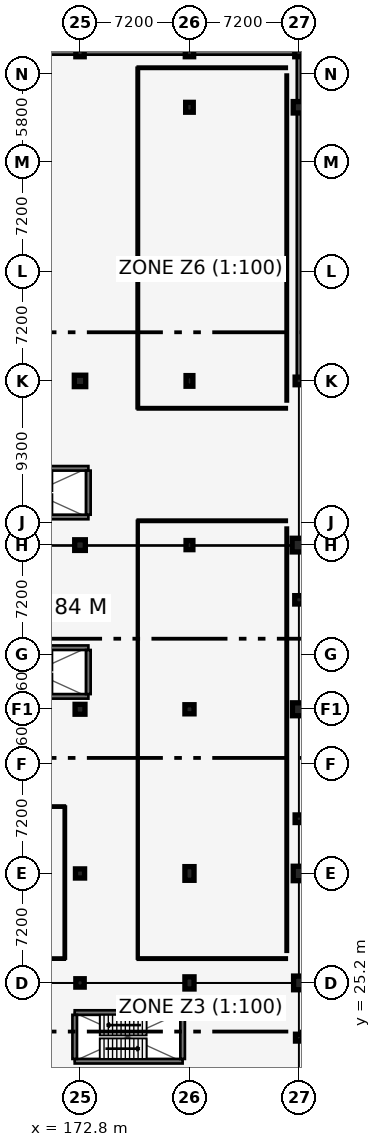
"""IFC4 building model, lengths in metres.
Left out: names, types, materials, properties, quantities, classifications, styles, units other than length and angle.
Written with IfcOpenShell. Run it as: python <this file> out.ifc"""

import sys

from ifc_helpers import new_model, si_unit, direction, frame, frame_2d, origin, origin_2d, place, context, subcontext, project, spatial, rectangle, circle, extrude, element, fill, save


model = new_model("IFC4")
c1 = context("Model", 3, precision=1e-05, world=origin(), true_north=direction((0.0, 1.0)))
c2 = subcontext(c1, "Body", "Model", "MODEL_VIEW")
j1 = project(units=[si_unit("LENGTHUNIT", "METRE"), si_unit("PLANEANGLEUNIT", "RADIAN")], contexts=[c1])
p1 = place(None, origin())
s1 = spatial("IfcSite", under=j1, at=p1, CompositionType="ELEMENT")
p2 = place(p1, origin())
s2 = spatial("IfcBuilding", under=s1, at=p2, CompositionType="ELEMENT")
p3 = place(p2, frame((0.0, 0.0, 4.8)))
s3 = spatial("IfcBuildingStorey", under=s2, at=p3, CompositionType="ELEMENT", Elevation=4.8)
p4 = place(p3, frame((172.8, 25.2, 0.0), z_axis=(0.0, 0.0, 1.0), x_axis=(1.0, 0.0, 0.0)))
e1 = element("IfcColumn", 1, at=p4, inside=s3, PredefinedType="COLUMN", context=c2, shape_type="SweptSolid", body=[
    extrude(rectangle(XDim=0.55, YDim=0.55, at=origin_2d()), origin(), (0.0, 0.0, 1.0), 4.2),
])
p5 = place(p3, frame((172.8, 32.4, 0.0), z_axis=(0.0, 0.0, 1.0), x_axis=(1.0, 0.0, 0.0)))
e2 = element("IfcColumn", 2, at=p5, inside=s3, PredefinedType="COLUMN", context=c2, shape_type="SweptSolid", body=[
    extrude(rectangle(XDim=0.6, YDim=0.6, at=origin_2d()), origin(), (0.0, 0.0, 1.0), 4.2),
])
p6 = place(p3, frame((172.8, 43.2, 0.0), z_axis=(0.0, 0.0, 1.0), x_axis=(1.0, 0.0, 0.0)))
e3 = element("IfcColumn", 3, at=p6, inside=s3, PredefinedType="COLUMN", context=c2, shape_type="SweptSolid", body=[
    extrude(rectangle(XDim=0.65, YDim=0.65, at=origin_2d()), origin(), (0.0, 0.0, 1.0), 4.2),
])
p7 = place(p3, frame((172.8, 54.0, 0.0), z_axis=(0.0, 0.0, 1.0), x_axis=(1.0, 0.0, 0.0)))
e4 = element("IfcColumn", 4, at=p7, inside=s3, PredefinedType="COLUMN", context=c2, shape_type="SweptSolid", body=[
    extrude(rectangle(XDim=0.7, YDim=0.7, at=origin_2d()), origin(), (0.0, 0.0, 1.0), 4.2),
])
p8 = place(p3, frame((172.8, 64.8, 0.0), z_axis=(0.0, 0.0, 1.0), x_axis=(1.0, 0.0, 0.0)))
e5 = element("IfcColumn", 5, at=p8, inside=s3, PredefinedType="COLUMN", context=c2, shape_type="SweptSolid", body=[
    extrude(rectangle(XDim=0.75, YDim=0.75, at=origin_2d()), origin(), (0.0, 0.0, 1.0), 4.2),
])
p9 = place(p3, frame((172.8, 86.4, 0.0), z_axis=(0.0, 0.0, 1.0), x_axis=(1.0, 0.0, 0.0)))
e6 = element("IfcColumn", 6, at=p9, inside=s3, PredefinedType="COLUMN", context=c2, shape_type="SweptSolid", body=[
    extrude(rectangle(XDim=0.55, YDim=0.55, at=origin_2d()), origin(), (0.0, 0.0, 1.0), 4.2),
])
p10 = place(p3, frame((180.0, 25.2, 0.0), z_axis=(0.0, 0.0, 1.0), x_axis=(1.0, 0.0, 0.0)))
e7 = element("IfcColumn", 7, at=p10, inside=s3, PredefinedType="COLUMN", context=c2, shape_type="SweptSolid", body=[
    extrude(rectangle(XDim=0.6, YDim=0.8, at=origin_2d()), origin(), (0.0, 0.0, 1.0), 4.2),
])
p11 = place(p3, frame((180.0, 32.4, 0.0), z_axis=(0.0, 0.0, 1.0), x_axis=(1.0, 0.0, 0.0)))
e8 = element("IfcColumn", 8, at=p11, inside=s3, PredefinedType="COLUMN", context=c2, shape_type="SweptSolid", body=[
    extrude(rectangle(XDim=0.6, YDim=0.9, at=origin_2d()), origin(), (0.0, 0.0, 1.0), 4.2),
])
p12 = place(p3, frame((180.0, 43.2, 0.0), z_axis=(0.0, 0.0, 1.0), x_axis=(1.0, 0.0, 0.0)))
e9 = element("IfcColumn", 9, at=p12, inside=s3, PredefinedType="COLUMN", context=c2, shape_type="SweptSolid", body=[
    extrude(circle(Radius=0.3, at=origin_2d()), origin(), (0.0, 0.0, 1.0), 4.2),
])
p13 = place(p3, frame((180.0, 54.0, 0.0), z_axis=(0.0, 0.0, 1.0), x_axis=(1.0, 0.0, 0.0)))
e10 = element("IfcColumn", 10, at=p13, inside=s3, PredefinedType="COLUMN", context=c2, shape_type="SweptSolid", body=[
    extrude(rectangle(XDim=0.45, YDim=0.6, at=origin_2d()), origin(), (0.0, 0.0, 1.0), 4.2),
])
p14 = place(p3, frame((180.0, 64.8, 0.0), z_axis=(0.0, 0.0, 1.0), x_axis=(1.0, 0.0, 0.0)))
e11 = element("IfcColumn", 11, at=p14, inside=s3, PredefinedType="COLUMN", context=c2, shape_type="SweptSolid", body=[
    extrude(rectangle(XDim=0.45, YDim=0.7, at=origin_2d()), origin(), (0.0, 0.0, 1.0), 4.2),
])
p15 = place(p3, frame((180.0, 82.8, 0.0), z_axis=(0.0, 0.0, 1.0), x_axis=(1.0, 0.0, 0.0)))
e12 = element("IfcColumn", 12, at=p15, inside=s3, PredefinedType="COLUMN", context=c2, shape_type="SweptSolid", body=[
    extrude(rectangle(XDim=0.5, YDim=0.65, at=origin_2d()), origin(), (0.0, 0.0, 1.0), 4.2),
])
p16 = place(p3, frame((180.0, 86.4, 0.0), z_axis=(0.0, 0.0, 1.0), x_axis=(1.0, 0.0, 0.0)))
e13 = element("IfcColumn", 13, at=p16, inside=s3, PredefinedType="COLUMN", context=c2, shape_type="SweptSolid", body=[
    extrude(rectangle(XDim=0.55, YDim=0.55, at=origin_2d()), origin(), (0.0, 0.0, 1.0), 4.2),
])
p17 = place(p3, frame((187.2, 21.6, 0.0), z_axis=(0.0, 0.0, 1.0), x_axis=(1.0, 0.0, 0.0)))
e14 = element("IfcColumn", 14, at=p17, inside=s3, PredefinedType="COLUMN", context=c2, shape_type="SweptSolid", body=[
    extrude(rectangle(XDim=0.45, YDim=0.45, at=origin_2d()), origin(), (0.0, 0.0, 1.0), 4.2),
])
p18 = place(p3, frame((187.2, 25.2, 0.0), z_axis=(0.0, 0.0, 1.0), x_axis=(1.0, 0.0, 0.0)))
e15 = element("IfcColumn", 15, at=p18, inside=s3, PredefinedType="COLUMN", context=c2, shape_type="SweptSolid", body=[
    extrude(rectangle(XDim=0.7, YDim=0.9, at=origin_2d()), origin(), (0.0, 0.0, 1.0), 4.2),
])
p19 = place(p3, frame((187.2, 32.4, 0.0), z_axis=(0.0, 0.0, 1.0), x_axis=(1.0, 0.0, 0.0)))
e16 = element("IfcColumn", 16, at=p19, inside=s3, PredefinedType="COLUMN", context=c2, shape_type="SweptSolid", body=[
    extrude(rectangle(XDim=0.75, YDim=0.95, at=origin_2d()), origin(), (0.0, 0.0, 1.0), 4.2),
])
p20 = place(p3, frame((187.2, 36.0, 0.0), z_axis=(0.0, 0.0, 1.0), x_axis=(1.0, 0.0, 0.0)))
e17 = element("IfcColumn", 17, at=p20, inside=s3, PredefinedType="COLUMN", context=c2, shape_type="SweptSolid", body=[
    extrude(rectangle(XDim=0.5, YDim=0.5, at=origin_2d()), origin(), (0.0, 0.0, 1.0), 4.2),
])
p21 = place(p3, frame((187.2, 43.2, 0.0), z_axis=(0.0, 0.0, 1.0), x_axis=(1.0, 0.0, 0.0)))
e18 = element("IfcColumn", 18, at=p21, inside=s3, PredefinedType="COLUMN", context=c2, shape_type="SweptSolid", body=[
    extrude(rectangle(XDim=0.85, YDim=0.85, at=origin_2d()), origin(), (0.0, 0.0, 1.0), 4.2),
])
p22 = place(p3, frame((187.2, 50.4, 0.0), z_axis=(0.0, 0.0, 1.0), x_axis=(1.0, 0.0, 0.0)))
e19 = element("IfcColumn", 19, at=p22, inside=s3, PredefinedType="COLUMN", context=c2, shape_type="SweptSolid", body=[
    extrude(rectangle(XDim=0.55, YDim=0.55, at=origin_2d()), origin(), (0.0, 0.0, 1.0), 4.2),
])
p23 = place(p3, frame((187.2, 54.0, 0.0), z_axis=(0.0, 0.0, 1.0), x_axis=(1.0, 0.0, 0.0)))
e20 = element("IfcColumn", 20, at=p23, inside=s3, PredefinedType="COLUMN", context=c2, shape_type="SweptSolid", body=[
    extrude(rectangle(XDim=0.9, YDim=0.9, at=origin_2d()), origin(), (0.0, 0.0, 1.0), 4.2),
])
p24 = place(p3, frame((187.2, 64.8, 0.0), z_axis=(0.0, 0.0, 1.0), x_axis=(1.0, 0.0, 0.0)))
e21 = element("IfcColumn", 21, at=p24, inside=s3, PredefinedType="COLUMN", context=c2, shape_type="SweptSolid", body=[
    extrude(circle(Radius=0.25, at=origin_2d()), origin(), (0.0, 0.0, 1.0), 4.2),
])
p25 = place(p3, frame((187.2, 82.8, 0.0), z_axis=(0.0, 0.0, 1.0), x_axis=(1.0, 0.0, 0.0)))
e22 = element("IfcColumn", 22, at=p25, inside=s3, PredefinedType="COLUMN", context=c2, shape_type="SweptSolid", body=[
    extrude(circle(Radius=0.375, at=origin_2d()), origin(), (0.0, 0.0, 1.0), 4.2),
])
p26 = place(p3, frame((187.2, 86.4, 0.0), z_axis=(0.0, 0.0, 1.0), x_axis=(1.0, 0.0, 0.0)))
e23 = element("IfcColumn", 23, at=p26, inside=s3, PredefinedType="COLUMN", context=c2, shape_type="SweptSolid", body=[
    extrude(rectangle(XDim=0.55, YDim=0.55, at=origin_2d()), origin(), (0.0, 0.0, 1.0), 4.2),
])
p27 = place(p3, frame((187.2, 64.8, 0.0), z_axis=(0.0, 0.0, 1.0), x_axis=(0.0, 1.0, 0.0)))
e24 = element("IfcWall", 24, at=p27, inside=s3, PredefinedType="SOLIDWALL", context=c2, shape_type="SweptSolid", body=[
    extrude(rectangle(XDim=21.6, YDim=0.28, at=frame_2d((10.8, 0.0))), origin(), (0.0, 0.0, 1.0), 3.5),
])
p28 = place(p27, frame((2.2, 0.0, 0.78)))
e25 = element("IfcOpeningElement", 25, at=p28, cuts=e24, PredefinedType="OPENING", context=c2, shape_type="SweptSolid", body=[
    extrude(rectangle(XDim=1.95, YDim=1.8, at=frame_2d((0.975, 0.9))), frame((0.0, 0.15, 0.0), z_axis=(0.0, -1.0, 0.0), x_axis=(1.0, 0.0, 0.0)), (0.0, 0.0, 1.0), 0.3),
])
p29 = place(p27, frame((9.4, 0.0, 0.78)))
e26 = element("IfcOpeningElement", 26, at=p29, cuts=e24, PredefinedType="OPENING", context=c2, shape_type="SweptSolid", body=[
    extrude(rectangle(XDim=2.1, YDim=1.8, at=frame_2d((1.05, 0.9))), frame((0.0, 0.15, 0.0), z_axis=(0.0, -1.0, 0.0), x_axis=(1.0, 0.0, 0.0)), (0.0, 0.0, 1.0), 0.3),
])
p30 = place(p3, frame((187.2, 86.4, 0.0), z_axis=(0.0, 0.0, 1.0), x_axis=(-1.0, 0.0, 0.0)))
e27 = element("IfcWall", 27, at=p30, inside=s3, PredefinedType="SOLIDWALL", context=c2, shape_type="SweptSolid", body=[
    extrude(rectangle(XDim=21.6, YDim=0.28, at=frame_2d((10.8, 0.0))), origin(), (0.0, 0.0, 1.0), 3.5),
])
p31 = place(p30, frame((2.2, 0.0, 0.78)))
e28 = element("IfcOpeningElement", 28, at=p31, cuts=e27, PredefinedType="OPENING", context=c2, shape_type="SweptSolid", body=[
    extrude(rectangle(XDim=2.1, YDim=1.8, at=frame_2d((1.05, 0.9))), frame((0.0, 0.15, 0.0), z_axis=(0.0, -1.0, 0.0), x_axis=(1.0, 0.0, 0.0)), (0.0, 0.0, 1.0), 0.3),
])
p32 = place(p30, frame((9.4, 0.0, 0.78)))
e29 = element("IfcOpeningElement", 29, at=p32, cuts=e27, PredefinedType="OPENING", context=c2, shape_type="SweptSolid", body=[
    extrude(rectangle(XDim=1.1, YDim=1.65, at=frame_2d((0.55, 0.825))), frame((0.0, 0.15, 0.0), z_axis=(0.0, -1.0, 0.0), x_axis=(1.0, 0.0, 0.0)), (0.0, 0.0, 1.0), 0.3),
])
p33 = place(p3, frame((216.0, 64.8, 0.0), z_axis=(0.0, 0.0, 1.0), x_axis=(-1.0, 0.0, 0.0)))
e30 = element("IfcWall", 30, at=p33, inside=s3, PredefinedType="SOLIDWALL", context=c2, shape_type="SweptSolid", body=[
    extrude(rectangle(XDim=28.8, YDim=0.28, at=frame_2d((14.4, 0.0))), origin(), (0.0, 0.0, 1.0), 3.235),
])
p34 = place(p33, frame((2.2, 0.0, 0.72)))
e31 = element("IfcOpeningElement", 31, at=p34, cuts=e30, PredefinedType="OPENING", context=c2, shape_type="SweptSolid", body=[
    extrude(rectangle(XDim=1.8, YDim=2.15, at=frame_2d((0.9, 1.075))), frame((0.0, 0.15, 0.0), z_axis=(0.0, -1.0, 0.0), x_axis=(1.0, 0.0, 0.0)), (0.0, 0.0, 1.0), 0.3),
])
p35 = place(p33, frame((9.4, 0.0, 0.72)))
e32 = element("IfcOpeningElement", 32, at=p35, cuts=e30, PredefinedType="OPENING", context=c2, shape_type="SweptSolid", body=[
    extrude(rectangle(XDim=1.2, YDim=2.0, at=frame_2d((0.6, 1.0))), frame((0.0, 0.15, 0.0), z_axis=(0.0, -1.0, 0.0), x_axis=(1.0, 0.0, 0.0)), (0.0, 0.0, 1.0), 0.3),
])
p36 = place(p33, frame((16.6, 0.0, 0.72)))
e33 = element("IfcOpeningElement", 33, at=p36, cuts=e30, PredefinedType="OPENING", context=c2, shape_type="SweptSolid", body=[
    extrude(rectangle(XDim=1.35, YDim=2.05, at=frame_2d((0.675, 1.025))), frame((0.0, 0.15, 0.0), z_axis=(0.0, -1.0, 0.0), x_axis=(1.0, 0.0, 0.0)), (0.0, 0.0, 1.0), 0.3),
])
p37 = place(p3, frame((172.45, 20.05, 0.0), z_axis=(0.0, 0.0, 1.0), x_axis=(1.0, 0.0, 0.0)))
e34 = element("IfcWall", 34, at=p37, inside=s3, PredefinedType="SHEAR", context=c2, shape_type="SweptSolid", body=[
    extrude(rectangle(XDim=7.1, YDim=0.3, at=frame_2d((3.55, 0.0))), origin(), (0.0, 0.0, 1.0), 3.84),
])
p38 = place(p37, frame((0.35, 0.0, 0.0)))
e35 = element("IfcOpeningElement", 35, at=p38, cuts=e34, PredefinedType="OPENING", context=c2, shape_type="SweptSolid", body=[
    extrude(rectangle(XDim=1.07, YDim=2.15, at=frame_2d((0.535, 1.075))), frame((0.0, 0.16, 0.0), z_axis=(0.0, -1.0, 0.0), x_axis=(1.0, 0.0, 0.0)), (0.0, 0.0, 1.0), 0.32),
])
p39 = place(p3, frame((179.55, 23.25, 0.0), z_axis=(0.0, 0.0, 1.0), x_axis=(-1.0, 0.0, 0.0)))
e36 = element("IfcWall", 36, at=p39, inside=s3, PredefinedType="SHEAR", context=c2, shape_type="SweptSolid", body=[
    extrude(rectangle(XDim=7.1, YDim=0.3, at=frame_2d((3.55, 0.0))), origin(), (0.0, 0.0, 1.0), 3.84),
])
for number, where, z_axis, x_axis in (
    (37, (179.55, 20.2, 0.0), (0.0, 0.0, 1.0), (0.0, 1.0, 0.0)),
    (38, (172.45, 23.1, 0.0), (0.0, 0.0, 1.0), (0.0, -1.0, 0.0)),
):
    element("IfcWall", number, at=place(p3, frame(where, z_axis=z_axis, x_axis=x_axis)), inside=s3, PredefinedType="SHEAR", context=c2, shape_type="SweptSolid", body=[
        extrude(rectangle(XDim=2.9, YDim=0.3, at=frame_2d((1.45, 0.0))), origin(), (0.0, 0.0, 1.0), 3.84),
    ])
for number, where, z_axis, x_axis in (
    (39, (166.25, 44.05, 0.0), (0.0, 0.0, 1.0), (1.0, 0.0, 0.0)),
    (40, (173.35, 47.25, 0.0), (0.0, 0.0, 1.0), (-1.0, 0.0, 0.0)),
):
    element("IfcWall", number, at=place(p3, frame(where, z_axis=z_axis, x_axis=x_axis)), inside=s3, PredefinedType="SHEAR", context=c2, shape_type="SweptSolid", body=[
        extrude(rectangle(XDim=7.1, YDim=0.3, at=frame_2d((3.55, 0.0))), origin(), (0.0, 0.0, 1.0), 3.925),
    ])
p40 = place(p3, frame((173.35, 44.2, 0.0), z_axis=(0.0, 0.0, 1.0), x_axis=(0.0, 1.0, 0.0)))
e41 = element("IfcWall", 41, at=p40, inside=s3, PredefinedType="SHEAR", context=c2, shape_type="SweptSolid", body=[
    extrude(rectangle(XDim=2.9, YDim=0.3, at=frame_2d((1.45, 0.0))), origin(), (0.0, 0.0, 1.0), 3.925),
])
for number, where, z_axis, x_axis in (
    (42, (166.25, 55.85, 0.0), (0.0, 0.0, 1.0), (1.0, 0.0, 0.0)),
    (43, (173.35, 59.05, 0.0), (0.0, 0.0, 1.0), (-1.0, 0.0, 0.0)),
):
    element("IfcWall", number, at=place(p3, frame(where, z_axis=z_axis, x_axis=x_axis)), inside=s3, PredefinedType="SHEAR", context=c2, shape_type="SweptSolid", body=[
        extrude(rectangle(XDim=7.1, YDim=0.3, at=frame_2d((3.55, 0.0))), origin(), (0.0, 0.0, 1.0), 3.925),
    ])
p41 = place(p3, frame((173.35, 56.0, 0.0), z_axis=(0.0, 0.0, 1.0), x_axis=(0.0, 1.0, 0.0)))
e44 = element("IfcWall", 44, at=p41, inside=s3, PredefinedType="SHEAR", context=c2, shape_type="SweptSolid", body=[
    extrude(rectangle(XDim=2.9, YDim=0.3, at=frame_2d((1.45, 0.0))), origin(), (0.0, 0.0, 1.0), 3.925),
])
p42 = place(p3, frame((176.6, 55.6, 0.0), z_axis=(0.0, 0.0, 1.0), x_axis=(1.0, 0.0, 0.0)))
e45 = element("IfcWall", 45, at=p42, inside=s3, PredefinedType="PARTITIONING", context=c2, shape_type="SweptSolid", body=[
    extrude(rectangle(XDim=9.8, YDim=0.15, at=frame_2d((4.9, 0.0))), origin(), (0.0, 0.0, 1.0), 3.057),
])
p43 = place(p3, frame((186.4, 26.8, 0.0), z_axis=(0.0, 0.0, 1.0), x_axis=(-1.0, 0.0, 0.0)))
e46 = element("IfcWall", 46, at=p43, inside=s3, PredefinedType="PARTITIONING", context=c2, shape_type="SweptSolid", body=[
    extrude(rectangle(XDim=9.8, YDim=0.15, at=frame_2d((4.9, 0.0))), origin(), (0.0, 0.0, 1.0), 3.472),
])
p44 = place(p3, frame((186.4, 27.25, 0.0), z_axis=(0.0, 0.0, 1.0), x_axis=(0.0, 1.0, 0.0)))
e47 = element("IfcWall", 47, at=p44, inside=s3, PredefinedType="PARTITIONING", context=c2, shape_type="SweptSolid", body=[
    extrude(rectangle(XDim=27.9, YDim=0.15, at=frame_2d((13.95, 0.0))), origin(), (0.0, 0.0, 1.0), 3.007),
])
p45 = place(p3, frame((176.6, 55.6, 0.0), z_axis=(0.0, 0.0, 1.0), x_axis=(0.0, -1.0, 0.0)))
e48 = element("IfcWall", 48, at=p45, inside=s3, PredefinedType="PARTITIONING", context=c2, shape_type="SweptSolid", body=[
    extrude(rectangle(XDim=28.8, YDim=0.11, at=frame_2d((14.4, 0.0))), origin(), (0.0, 0.0, 1.0), 3.057),
])
p46 = place(p45, frame((13.915, 0.0, 0.0)))
e49 = element("IfcOpeningElement", 49, at=p46, cuts=e48, PredefinedType="OPENING", context=c2, shape_type="SweptSolid", body=[
    extrude(rectangle(XDim=0.97, YDim=2.15, at=frame_2d((0.485, 1.075))), frame((0.0, 0.065, 0.0), z_axis=(0.0, -1.0, 0.0), x_axis=(1.0, 0.0, 0.0)), (0.0, 0.0, 1.0), 0.13),
])
p47 = place(p3, frame((176.6, 85.4, 0.0), z_axis=(0.0, 0.0, 1.0), x_axis=(1.0, 0.0, 0.0)))
e50 = element("IfcWall", 50, at=p47, inside=s3, PredefinedType="PARTITIONING", context=c2, shape_type="SweptSolid", body=[
    extrude(rectangle(XDim=9.8, YDim=0.15, at=frame_2d((4.9, 0.0))), origin(), (0.0, 0.0, 1.0), 3.007),
])
p48 = place(p3, frame((186.4, 63.0, 0.0), z_axis=(0.0, 0.0, 1.0), x_axis=(-1.0, 0.0, 0.0)))
e51 = element("IfcWall", 51, at=p48, inside=s3, PredefinedType="PARTITIONING", context=c2, shape_type="SweptSolid", body=[
    extrude(rectangle(XDim=9.8, YDim=0.15, at=frame_2d((4.9, 0.0))), origin(), (0.0, 0.0, 1.0), 3.057),
])
p49 = place(p3, frame((186.4, 63.45, 0.0), z_axis=(0.0, 0.0, 1.0), x_axis=(0.0, 1.0, 0.0)))
e52 = element("IfcWall", 52, at=p49, inside=s3, PredefinedType="PARTITIONING", context=c2, shape_type="SweptSolid", body=[
    extrude(rectangle(XDim=21.5, YDim=0.15, at=frame_2d((10.75, 0.0))), origin(), (0.0, 0.0, 1.0), 3.407),
])
p50 = place(p3, frame((176.6, 85.4, 0.0), z_axis=(0.0, 0.0, 1.0), x_axis=(0.0, -1.0, 0.0)))
e53 = element("IfcWall", 53, at=p50, inside=s3, PredefinedType="PARTITIONING", context=c2, shape_type="SweptSolid", body=[
    extrude(rectangle(XDim=22.4, YDim=0.15, at=frame_2d((11.2, 0.0))), origin(), (0.0, 0.0, 1.0), 2.907),
])
p51 = place(p50, frame((10.72, 0.0, 0.0)))
e54 = element("IfcOpeningElement", 54, at=p51, cuts=e53, PredefinedType="OPENING", context=c2, shape_type="SweptSolid", body=[
    extrude(rectangle(XDim=0.96, YDim=2.15, at=frame_2d((0.48, 1.075))), frame((0.0, 0.085, 0.0), z_axis=(0.0, -1.0, 0.0), x_axis=(1.0, 0.0, 0.0)), (0.0, 0.0, 1.0), 0.17),
])
for number, where, z_axis, x_axis in (
    (55, (166.2, 36.8, 0.0), (0.0, 0.0, 1.0), (1.0, 0.0, 0.0)),
    (56, (171.8, 26.8, 0.0), (0.0, 0.0, 1.0), (-1.0, 0.0, 0.0)),
):
    element("IfcWall", number, at=place(p3, frame(where, z_axis=z_axis, x_axis=x_axis)), inside=s3, PredefinedType="PARTITIONING", context=c2, shape_type="SweptSolid", body=[
        extrude(rectangle(XDim=5.6, YDim=0.14, at=frame_2d((2.8, 0.0))), origin(), (0.0, 0.0, 1.0), 3.5),
    ])
p52 = place(p3, frame((171.8, 26.8, 0.0), z_axis=(0.0, 0.0, 1.0), x_axis=(0.0, 1.0, 0.0)))
e57 = element("IfcWall", 57, at=p52, inside=s3, PredefinedType="PARTITIONING", context=c2, shape_type="SweptSolid", body=[
    extrude(rectangle(XDim=10.0, YDim=0.14, at=frame_2d((5.0, 0.0))), origin(), (0.0, 0.0, 1.0), 3.5),
])
p53 = place(p52, frame((2.703, 0.0, 0.0)))
e58 = element("IfcOpeningElement", 58, at=p53, cuts=e57, PredefinedType="OPENING", context=c2, shape_type="SweptSolid", body=[
    extrude(rectangle(XDim=0.99, YDim=2.15, at=frame_2d((0.495, 1.075))), frame((0.0, 0.08, 0.0), z_axis=(0.0, -1.0, 0.0), x_axis=(1.0, 0.0, 0.0)), (0.0, 0.0, 1.0), 0.16),
])
p54 = place(p28, origin())
e59 = element("IfcWindow", 59, at=p54, inside=s3, PartitioningType="SINGLE_PANEL", PredefinedType="WINDOW", context=c2, shape_type="SweptSolid", body=[
    extrude(rectangle(XDim=1.95, YDim=1.8, at=frame_2d((0.975, 0.9))), frame((0.0, 0.03, 0.0), z_axis=(0.0, -1.0, 0.0), x_axis=(1.0, 0.0, 0.0)), (0.0, 0.0, 1.0), 0.06),
])
fill(e25, e59)
p55 = place(p29, origin())
e60 = element("IfcWindow", 60, at=p55, inside=s3, PartitioningType="SINGLE_PANEL", PredefinedType="WINDOW", context=c2, shape_type="SweptSolid", body=[
    extrude(rectangle(XDim=2.1, YDim=1.8, at=frame_2d((1.05, 0.9))), frame((0.0, 0.03, 0.0), z_axis=(0.0, -1.0, 0.0), x_axis=(1.0, 0.0, 0.0)), (0.0, 0.0, 1.0), 0.06),
])
fill(e26, e60)
p56 = place(p31, origin())
e61 = element("IfcWindow", 61, at=p56, inside=s3, PartitioningType="SINGLE_PANEL", PredefinedType="WINDOW", context=c2, shape_type="SweptSolid", body=[
    extrude(rectangle(XDim=2.1, YDim=1.8, at=frame_2d((1.05, 0.9))), frame((0.0, 0.03, 0.0), z_axis=(0.0, -1.0, 0.0), x_axis=(1.0, 0.0, 0.0)), (0.0, 0.0, 1.0), 0.06),
])
fill(e28, e61)
p57 = place(p32, origin())
e62 = element("IfcWindow", 62, at=p57, inside=s3, PartitioningType="SINGLE_PANEL", PredefinedType="WINDOW", context=c2, shape_type="SweptSolid", body=[
    extrude(rectangle(XDim=1.1, YDim=1.65, at=frame_2d((0.55, 0.825))), frame((0.0, 0.03, 0.0), z_axis=(0.0, -1.0, 0.0), x_axis=(1.0, 0.0, 0.0)), (0.0, 0.0, 1.0), 0.06),
])
fill(e29, e62)
p58 = place(p38, origin())
e63 = element("IfcDoor", 63, at=p58, inside=s3, OperationType="SINGLE_SWING_RIGHT", PredefinedType="DOOR", context=c2, shape_type="SweptSolid", body=[
    extrude(rectangle(XDim=1.07, YDim=2.15, at=frame_2d((0.535, 1.075))), frame((0.0, 0.025, 0.0), z_axis=(0.0, -1.0, 0.0), x_axis=(1.0, 0.0, 0.0)), (0.0, 0.0, 1.0), 0.05),
])
fill(e35, e63)
p59 = place(p46, origin())
e64 = element("IfcDoor", 64, at=p59, inside=s3, OperationType="SINGLE_SWING_RIGHT", PredefinedType="DOOR", context=c2, shape_type="SweptSolid", body=[
    extrude(rectangle(XDim=0.97, YDim=2.15, at=frame_2d((0.485, 1.075))), frame((0.0, 0.025, 0.0), z_axis=(0.0, -1.0, 0.0), x_axis=(1.0, 0.0, 0.0)), (0.0, 0.0, 1.0), 0.05),
])
fill(e49, e64)
p60 = place(p51, origin())
e65 = element("IfcDoor", 65, at=p60, inside=s3, OperationType="SINGLE_SWING_LEFT", PredefinedType="DOOR", context=c2, shape_type="SweptSolid", body=[
    extrude(rectangle(XDim=0.96, YDim=2.15, at=frame_2d((0.48, 1.075))), frame((0.0, 0.025, 0.0), z_axis=(0.0, -1.0, 0.0), x_axis=(1.0, 0.0, 0.0)), (0.0, 0.0, 1.0), 0.05),
])
fill(e54, e65)
p61 = place(p53, origin())
e66 = element("IfcDoor", 66, at=p61, inside=s3, OperationType="SINGLE_SWING_RIGHT", PredefinedType="DOOR", context=c2, shape_type="SweptSolid", body=[
    extrude(rectangle(XDim=0.99, YDim=2.15, at=frame_2d((0.495, 1.075))), frame((0.0, 0.025, 0.0), z_axis=(0.0, -1.0, 0.0), x_axis=(1.0, 0.0, 0.0)), (0.0, 0.0, 1.0), 0.05),
])
fill(e58, e66)
save(model, sys.argv[1])
